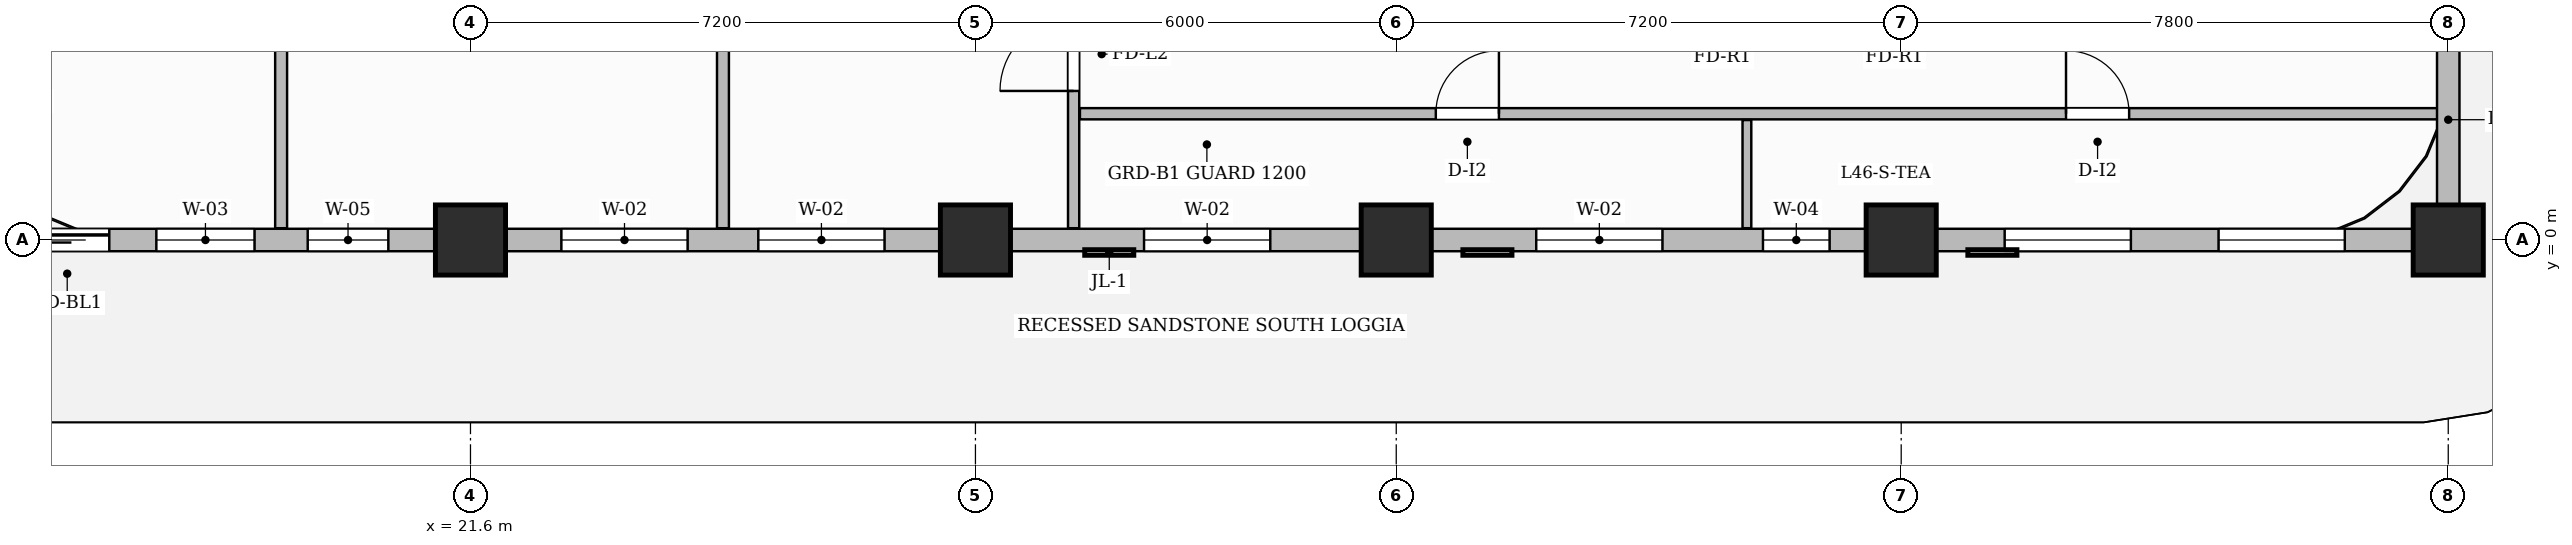
"""IFC4 building model, lengths in metres.
Left out: names, types, materials, properties, quantities, classifications, styles, units other than length and angle.
Written with IfcOpenShell. Run it as: python <this file> out.ifc"""

import sys

from ifc_helpers import new_model, si_unit, direction, frame, frame_2d, origin, origin_2d, place, context, subcontext, project, spatial, rectangle, extrude, source, transform, mapped, element, fill, save


model = new_model("IFC4")
c1 = context("Model", 3, precision=1e-05, world=origin(), true_north=direction((0.0, 1.0)))
c2 = subcontext(c1, "Body", "Model", "MODEL_VIEW")
j1 = project(units=[si_unit("LENGTHUNIT", "METRE"), si_unit("PLANEANGLEUNIT", "RADIAN")], contexts=[c1])
p1 = place(None, origin())
s1 = spatial("IfcSite", under=j1, at=p1, CompositionType="ELEMENT")
p2 = place(p1, origin())
s2 = spatial("IfcBuilding", under=s1, at=p2, CompositionType="ELEMENT")
p3 = place(p2, frame((0.0, 0.0, 184.95)))
s3 = spatial("IfcBuildingStorey", under=s2, at=p3, CompositionType="ELEMENT", Elevation=184.95)
m1 = source(origin(), c2, "Body", "SweptSolid", [
    extrude(rectangle(XDim=1.0, YDim=1.0, at=origin_2d()), origin(), (0.0, 0.0, 1.0), 3.85),
])
for number, where, z_axis, x_axis in (
    (1, (21.6, 0.0, 0.0), (0.0, 0.0, 1.0), (1.0, 0.0, 0.0)),
    (2, (28.8, 0.0, 0.0), (0.0, 0.0, 1.0), (1.0, 0.0, 0.0)),
    (3, (34.8, 0.0, 0.0), (0.0, 0.0, 1.0), (1.0, 0.0, 0.0)),
    (4, (42.0, 0.0, 0.0), (0.0, 0.0, 1.0), (1.0, 0.0, 0.0)),
    (5, (49.8, 0.0, 0.0), (0.0, 0.0, 1.0), (1.0, 0.0, 0.0)),
):
    element("IfcColumn", number, at=place(p3, frame(where, z_axis=z_axis, x_axis=x_axis)), inside=s3, PredefinedType="COLUMN", context=c2, shape_type="MappedRepresentation", body=[
        mapped(m1, transform((0.0, 0.0, 0.0), scale=1.0)),
    ])
p4 = place(p3, frame((30.2, 0.168, 0.0), z_axis=(0.0, 0.0, 1.0), x_axis=(0.0, 1.0, 0.0)))
e6 = element("IfcWall", 6, at=p4, inside=s3, PredefinedType="PARTITIONING", context=c2, shape_type="SweptSolid", body=[
    extrude(rectangle(XDim=10.092, YDim=0.16, at=frame_2d((5.046, 0.0))), origin(), (0.0, 0.0, 1.0), 3.6),
])
p5 = place(p4, frame((1.957, 0.0, 0.0)))
e7 = element("IfcOpeningElement", 7, at=p5, cuts=e6, PredefinedType="OPENING", context=c2, shape_type="SweptSolid", body=[
    extrude(rectangle(XDim=1.05, YDim=2.15, at=frame_2d((0.525, 1.075))), frame((0.0, 0.09, 0.0), z_axis=(0.0, -1.0, 0.0), x_axis=(1.0, 0.0, 0.0)), (0.0, 0.0, 1.0), 0.18),
])
p6 = place(p3, frame((30.29, 1.8, 0.0), z_axis=(0.0, 0.0, 1.0), x_axis=(1.0, 0.0, 0.0)))
e8 = element("IfcWall", 8, at=p6, inside=s3, PredefinedType="PARTITIONING", context=c2, shape_type="SweptSolid", body=[
    extrude(rectangle(XDim=19.37, YDim=0.16, at=frame_2d((9.685, 0.0))), origin(), (0.0, 0.0, 1.0), 3.6),
])
p7 = place(p6, frame((5.074, 0.0, 0.0)))
e9 = element("IfcOpeningElement", 9, at=p7, cuts=e8, PredefinedType="OPENING", context=c2, shape_type="SweptSolid", body=[
    extrude(rectangle(XDim=0.9, YDim=2.15, at=frame_2d((0.45, 1.075))), frame((0.0, 0.09, 0.0), z_axis=(0.0, -1.0, 0.0), x_axis=(1.0, 0.0, 0.0)), (0.0, 0.0, 1.0), 0.18),
])
p8 = place(p6, frame((14.06, 0.0, 0.0)))
e10 = element("IfcOpeningElement", 10, at=p8, cuts=e8, PredefinedType="OPENING", context=c2, shape_type="SweptSolid", body=[
    extrude(rectangle(XDim=0.9, YDim=2.15, at=frame_2d((0.45, 1.075))), frame((0.0, 0.09, 0.0), z_axis=(0.0, -1.0, 0.0), x_axis=(1.0, 0.0, 0.0)), (0.0, 0.0, 1.0), 0.18),
])
p9 = place(p3, frame((39.8, 0.168, 0.0), z_axis=(0.0, 0.0, 1.0), x_axis=(0.0, 1.0, 0.0)))
e11 = element("IfcWall", 11, at=p9, inside=s3, PredefinedType="PARTITIONING", context=c2, shape_type="SweptSolid", body=[
    extrude(rectangle(XDim=1.542, YDim=0.125, at=frame_2d((0.771, 0.0))), origin(), (0.0, 0.0, 1.0), 3.6),
])
p10 = place(p3, frame((18.9, 0.168, 0.0), z_axis=(0.0, 0.0, 1.0), x_axis=(0.0, 1.0, 0.0)))
e12 = element("IfcWall", 12, at=p10, inside=s3, PredefinedType="PARTITIONING", context=c2, shape_type="SweptSolid", body=[
    extrude(rectangle(XDim=10.092, YDim=0.17, at=frame_2d((5.046, 0.0))), origin(), (0.0, 0.0, 1.0), 3.6),
])
p11 = place(p3, frame((25.2, 0.168, 0.0), z_axis=(0.0, 0.0, 1.0), x_axis=(0.0, 1.0, 0.0)))
e13 = element("IfcWall", 13, at=p11, inside=s3, PredefinedType="PARTITIONING", context=c2, shape_type="SweptSolid", body=[
    extrude(rectangle(XDim=10.092, YDim=0.17, at=frame_2d((5.046, 0.0))), origin(), (0.0, 0.0, 1.0), 3.285),
])
p12 = place(p3, frame((14.4, 0.0, 0.0), z_axis=(0.0, 0.0, 1.0), x_axis=(1.0, 0.0, 0.0)))
e14 = element("IfcWall", 14, at=p12, inside=s3, PredefinedType="SOLIDWALL", context=c2, shape_type="SweptSolid", body=[
    extrude(rectangle(XDim=35.4, YDim=0.32, at=frame_2d((17.7, 0.0))), origin(), (0.0, 0.0, 1.0), 3.085),
])
p13 = place(p12, frame((0.85, 0.0, 0.0)))
e15 = element("IfcOpeningElement", 15, at=p13, cuts=e14, PredefinedType="OPENING", context=c2, shape_type="SweptSolid", body=[
    extrude(rectangle(XDim=1.2, YDim=2.2, at=frame_2d((0.6, 1.1))), frame((0.0, 0.17, 0.0), z_axis=(0.0, -1.0, 0.0), x_axis=(1.0, 0.0, 0.0)), (0.0, 0.0, 1.0), 0.34),
])
p14 = place(p12, frame((2.721, 0.0, 0.8)))
e16 = element("IfcOpeningElement", 16, at=p14, cuts=e14, PredefinedType="OPENING", context=c2, shape_type="SweptSolid", body=[
    extrude(rectangle(XDim=1.4, YDim=1.85, at=frame_2d((0.7, 0.925))), frame((0.0, 0.17, 0.0), z_axis=(0.0, -1.0, 0.0), x_axis=(1.0, 0.0, 0.0)), (0.0, 0.0, 1.0), 0.34),
])
p15 = place(p12, frame((4.879, 0.0, 0.8)))
e17 = element("IfcOpeningElement", 17, at=p15, cuts=e14, PredefinedType="OPENING", context=c2, shape_type="SweptSolid", body=[
    extrude(rectangle(XDim=1.15, YDim=1.8, at=frame_2d((0.575, 0.9))), frame((0.0, 0.17, 0.0), z_axis=(0.0, -1.0, 0.0), x_axis=(1.0, 0.0, 0.0)), (0.0, 0.0, 1.0), 0.34),
])
p16 = place(p12, frame((8.496, 0.0, 0.8)))
e18 = element("IfcOpeningElement", 18, at=p16, cuts=e14, PredefinedType="OPENING", context=c2, shape_type="SweptSolid", body=[
    extrude(rectangle(XDim=1.8, YDim=1.85, at=frame_2d((0.9, 0.925))), frame((0.0, 0.17, 0.0), z_axis=(0.0, -1.0, 0.0), x_axis=(1.0, 0.0, 0.0)), (0.0, 0.0, 1.0), 0.34),
])
p17 = place(p12, frame((11.304, 0.0, 0.8)))
e19 = element("IfcOpeningElement", 19, at=p17, cuts=e14, PredefinedType="OPENING", context=c2, shape_type="SweptSolid", body=[
    extrude(rectangle(XDim=1.8, YDim=1.85, at=frame_2d((0.9, 0.925))), frame((0.0, 0.17, 0.0), z_axis=(0.0, -1.0, 0.0), x_axis=(1.0, 0.0, 0.0)), (0.0, 0.0, 1.0), 0.34),
])
p18 = place(p12, frame((16.804, 0.0, 0.8)))
e20 = element("IfcOpeningElement", 20, at=p18, cuts=e14, PredefinedType="OPENING", context=c2, shape_type="SweptSolid", body=[
    extrude(rectangle(XDim=1.8, YDim=1.85, at=frame_2d((0.9, 0.925))), frame((0.0, 0.17, 0.0), z_axis=(0.0, -1.0, 0.0), x_axis=(1.0, 0.0, 0.0)), (0.0, 0.0, 1.0), 0.34),
])
p19 = place(p12, frame((22.396, 0.0, 0.8)))
e21 = element("IfcOpeningElement", 21, at=p19, cuts=e14, PredefinedType="OPENING", context=c2, shape_type="SweptSolid", body=[
    extrude(rectangle(XDim=1.8, YDim=1.85, at=frame_2d((0.9, 0.925))), frame((0.0, 0.17, 0.0), z_axis=(0.0, -1.0, 0.0), x_axis=(1.0, 0.0, 0.0)), (0.0, 0.0, 1.0), 0.34),
])
p20 = place(p12, frame((25.629, 0.0, 0.8)))
e22 = element("IfcOpeningElement", 22, at=p20, cuts=e14, PredefinedType="OPENING", context=c2, shape_type="SweptSolid", body=[
    extrude(rectangle(XDim=0.95, YDim=1.75, at=frame_2d((0.475, 0.875))), frame((0.0, 0.17, 0.0), z_axis=(0.0, -1.0, 0.0), x_axis=(1.0, 0.0, 0.0)), (0.0, 0.0, 1.0), 0.34),
])
p21 = place(p12, frame((29.075, 0.0, 0.8)))
e23 = element("IfcOpeningElement", 23, at=p21, cuts=e14, PredefinedType="OPENING", context=c2, shape_type="SweptSolid", body=[
    extrude(rectangle(XDim=1.8, YDim=1.85, at=frame_2d((0.9, 0.925))), frame((0.0, 0.17, 0.0), z_axis=(0.0, -1.0, 0.0), x_axis=(1.0, 0.0, 0.0)), (0.0, 0.0, 1.0), 0.34),
])
p22 = place(p12, frame((32.125, 0.0, 0.8)))
e24 = element("IfcOpeningElement", 24, at=p22, cuts=e14, PredefinedType="OPENING", context=c2, shape_type="SweptSolid", body=[
    extrude(rectangle(XDim=1.8, YDim=1.85, at=frame_2d((0.9, 0.925))), frame((0.0, 0.17, 0.0), z_axis=(0.0, -1.0, 0.0), x_axis=(1.0, 0.0, 0.0)), (0.0, 0.0, 1.0), 0.34),
])
p23 = place(p3, frame((49.8, 0.05, 0.0), z_axis=(0.0, 0.0, 1.0), x_axis=(0.0, 1.0, 0.0)))
e25 = element("IfcWall", 25, at=p23, inside=s3, PredefinedType="SOLIDWALL", context=c2, shape_type="SweptSolid", body=[
    extrude(rectangle(XDim=3.33, YDim=0.32, at=frame_2d((1.665, 0.0))), origin(), (0.0, 0.0, 1.0), 3.6),
])
m2 = source(origin(), c2, "Body", "SweptSolid", [
    extrude(rectangle(XDim=1.05, YDim=2.15, at=frame_2d((0.525, 1.075))), frame((0.0, 0.025, 0.0), z_axis=(0.0, -1.0, 0.0), x_axis=(1.0, 0.0, 0.0)), (0.0, 0.0, 1.0), 0.05),
])
p24 = place(p5, origin())
e26 = element("IfcDoor", 26, at=p24, inside=s3, OperationType="SINGLE_SWING_LEFT", PredefinedType="DOOR", context=c2, shape_type="MappedRepresentation", body=[
    mapped(m2, transform((0.0, 0.0, 0.0), scale=1.0)),
])
fill(e7, e26)
m3 = source(origin(), c2, "Body", "SweptSolid", [
    extrude(rectangle(XDim=0.9, YDim=2.15, at=frame_2d((0.45, 1.075))), frame((0.0, 0.025, 0.0), z_axis=(0.0, -1.0, 0.0), x_axis=(1.0, 0.0, 0.0)), (0.0, 0.0, 1.0), 0.05),
])
p25 = place(p7, origin())
e27 = element("IfcDoor", 27, at=p25, inside=s3, OperationType="SINGLE_SWING_RIGHT", PredefinedType="DOOR", context=c2, shape_type="MappedRepresentation", body=[
    mapped(m3, transform((0.0, 0.0, 0.0), scale=1.0)),
])
fill(e9, e27)
p26 = place(p8, origin())
e28 = element("IfcDoor", 28, at=p26, inside=s3, OperationType="SINGLE_SWING_LEFT", PredefinedType="DOOR", context=c2, shape_type="MappedRepresentation", body=[
    mapped(m3, transform((0.0, 0.0, 0.0), scale=1.0)),
])
fill(e10, e28)
m4 = source(origin(), c2, "Body", "SweptSolid", [
    extrude(rectangle(XDim=1.2, YDim=2.2, at=frame_2d((0.6, 1.1))), frame((0.0, 0.025, 0.0), z_axis=(0.0, -1.0, 0.0), x_axis=(1.0, 0.0, 0.0)), (0.0, 0.0, 1.0), 0.05),
])
p27 = place(p13, origin())
e29 = element("IfcDoor", 29, at=p27, inside=s3, OperationType="SLIDING_TO_LEFT", PredefinedType="DOOR", context=c2, shape_type="MappedRepresentation", body=[
    mapped(m4, transform((0.0, 0.0, 0.0), scale=1.0)),
])
fill(e15, e29)
m5 = source(origin(), c2, "Body", "SweptSolid", [
    extrude(rectangle(XDim=1.4, YDim=1.85, at=frame_2d((0.7, 0.925))), frame((0.0, 0.03, 0.0), z_axis=(0.0, -1.0, 0.0), x_axis=(1.0, 0.0, 0.0)), (0.0, 0.0, 1.0), 0.06),
])
p28 = place(p14, origin())
e30 = element("IfcWindow", 30, at=p28, inside=s3, PartitioningType="SINGLE_PANEL", PredefinedType="WINDOW", context=c2, shape_type="MappedRepresentation", body=[
    mapped(m5, transform((0.0, 0.0, 0.0), scale=1.0)),
])
fill(e16, e30)
m6 = source(origin(), c2, "Body", "SweptSolid", [
    extrude(rectangle(XDim=1.15, YDim=1.8, at=frame_2d((0.575, 0.9))), frame((0.0, 0.03, 0.0), z_axis=(0.0, -1.0, 0.0), x_axis=(1.0, 0.0, 0.0)), (0.0, 0.0, 1.0), 0.06),
])
p29 = place(p15, origin())
e31 = element("IfcWindow", 31, at=p29, inside=s3, PartitioningType="SINGLE_PANEL", PredefinedType="WINDOW", context=c2, shape_type="MappedRepresentation", body=[
    mapped(m6, transform((0.0, 0.0, 0.0), scale=1.0)),
])
fill(e17, e31)
m7 = source(origin(), c2, "Body", "SweptSolid", [
    extrude(rectangle(XDim=1.8, YDim=1.85, at=frame_2d((0.9, 0.925))), frame((0.0, 0.03, 0.0), z_axis=(0.0, -1.0, 0.0), x_axis=(1.0, 0.0, 0.0)), (0.0, 0.0, 1.0), 0.06),
])
p30 = place(p16, origin())
e32 = element("IfcWindow", 32, at=p30, inside=s3, PartitioningType="DOUBLE_PANEL_VERTICAL", PredefinedType="WINDOW", context=c2, shape_type="MappedRepresentation", body=[
    mapped(m7, transform((0.0, 0.0, 0.0), scale=1.0)),
])
fill(e18, e32)
p31 = place(p17, origin())
e33 = element("IfcWindow", 33, at=p31, inside=s3, PartitioningType="DOUBLE_PANEL_VERTICAL", PredefinedType="WINDOW", context=c2, shape_type="MappedRepresentation", body=[
    mapped(m7, transform((0.0, 0.0, 0.0), scale=1.0)),
])
fill(e19, e33)
p32 = place(p18, origin())
e34 = element("IfcWindow", 34, at=p32, inside=s3, PartitioningType="DOUBLE_PANEL_VERTICAL", PredefinedType="WINDOW", context=c2, shape_type="MappedRepresentation", body=[
    mapped(m7, transform((0.0, 0.0, 0.0), scale=1.0)),
])
fill(e20, e34)
p33 = place(p19, origin())
e35 = element("IfcWindow", 35, at=p33, inside=s3, PartitioningType="DOUBLE_PANEL_VERTICAL", PredefinedType="WINDOW", context=c2, shape_type="MappedRepresentation", body=[
    mapped(m7, transform((0.0, 0.0, 0.0), scale=1.0)),
])
fill(e21, e35)
m8 = source(origin(), c2, "Body", "SweptSolid", [
    extrude(rectangle(XDim=0.95, YDim=1.75, at=frame_2d((0.475, 0.875))), frame((0.0, 0.03, 0.0), z_axis=(0.0, -1.0, 0.0), x_axis=(1.0, 0.0, 0.0)), (0.0, 0.0, 1.0), 0.06),
])
p34 = place(p20, origin())
e36 = element("IfcWindow", 36, at=p34, inside=s3, PartitioningType="SINGLE_PANEL", PredefinedType="WINDOW", context=c2, shape_type="MappedRepresentation", body=[
    mapped(m8, transform((0.0, 0.0, 0.0), scale=1.0)),
])
fill(e22, e36)
p35 = place(p21, origin())
e37 = element("IfcWindow", 37, at=p35, inside=s3, PartitioningType="DOUBLE_PANEL_VERTICAL", PredefinedType="WINDOW", context=c2, shape_type="MappedRepresentation", body=[
    mapped(m7, transform((0.0, 0.0, 0.0), scale=1.0)),
])
fill(e23, e37)
p36 = place(p22, origin())
e38 = element("IfcWindow", 38, at=p36, inside=s3, PartitioningType="DOUBLE_PANEL_VERTICAL", PredefinedType="WINDOW", context=c2, shape_type="MappedRepresentation", body=[
    mapped(m7, transform((0.0, 0.0, 0.0), scale=1.0)),
])
fill(e24, e38)
save(model, sys.argv[1])
